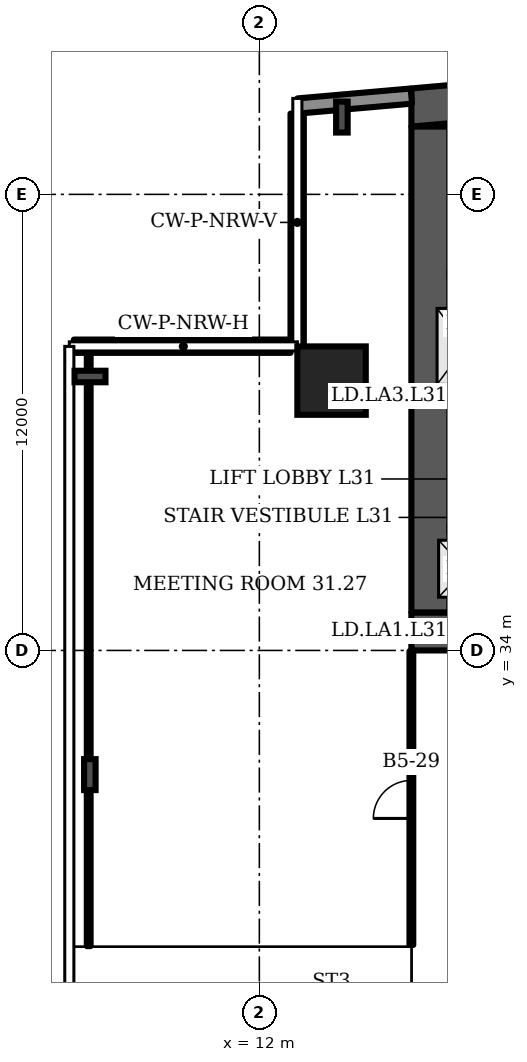
"""IFC4 building model, lengths in metres.
Left out: names, types, materials, properties, quantities, classifications, styles, units other than length and angle.
Written with IfcOpenShell. Run it as: python <this file> out.ifc"""

import sys

from ifc_helpers import new_model, si_unit, direction, frame, frame_2d, origin, origin_2d, place, context, subcontext, project, spatial, polyline, rectangle, i_section, outline, extrude, element, fill, save


model = new_model("IFC4")
c1 = context("Model", 3, precision=1e-05, world=origin(), true_north=direction((0.0, 1.0)))
c2 = subcontext(c1, "Body", "Model", "MODEL_VIEW")
j1 = project(units=[si_unit("LENGTHUNIT", "METRE"), si_unit("PLANEANGLEUNIT", "RADIAN")], contexts=[c1])
p1 = place(None, origin())
s1 = spatial("IfcSite", under=j1, at=p1, CompositionType="ELEMENT")
p2 = place(p1, origin())
s2 = spatial("IfcBuilding", under=s1, at=p2, CompositionType="ELEMENT")
p3 = place(p2, frame((0.0, 0.0, 132.7)))
s3 = spatial("IfcBuildingStorey", under=s2, at=p3, CompositionType="ELEMENT", Elevation=132.7)
p4 = place(p3, origin())
e1 = element("IfcWall", 1, at=p4, inside=s3, PredefinedType="SHEAR", context=c2, shape_type="SweptSolid", body=[
    extrude(outline(polyline([(16.0, 47.784), (40.5, 49.927), (65.0, 47.784), (65.0, 48.787), (40.5, 50.931), (16.0, 48.787), (16.0, 47.784)])), origin(), (0.0, 0.0, 1.0), 3.6),
])
p5 = place(p3, frame((16.0, 34.5, 0.0), z_axis=(0.0, 0.0, 1.0), x_axis=(1.0, 0.0, 0.0)))
e2 = element("IfcWall", 2, at=p5, inside=s3, PredefinedType="SHEAR", context=c2, shape_type="SweptSolid", body=[
    extrude(rectangle(XDim=49.0, YDim=1.0, at=frame_2d((24.5, 0.0))), origin(), (0.0, 0.0, 1.0), 3.6),
])
p6 = place(p5, frame((1.2, 0.0, 0.0)))
e3 = element("IfcOpeningElement", 3, at=p6, cuts=e2, PredefinedType="OPENING", context=c2, shape_type="SweptSolid", body=[
    extrude(rectangle(XDim=1.1, YDim=2.1, at=frame_2d((0.55, 1.05))), frame((0.0, 0.51, 0.0), z_axis=(0.0, -1.0, 0.0), x_axis=(1.0, 0.0, 0.0)), (0.0, 0.0, 1.0), 1.02),
])
p7 = place(p5, frame((5.083, 0.0, 0.0)))
e4 = element("IfcOpeningElement", 4, at=p7, cuts=e2, PredefinedType="OPENING", context=c2, shape_type="SweptSolid", body=[
    extrude(rectangle(XDim=1.1, YDim=2.1, at=frame_2d((0.55, 1.05))), frame((0.0, 0.51, 0.0), z_axis=(0.0, -1.0, 0.0), x_axis=(1.0, 0.0, 0.0)), (0.0, 0.0, 1.0), 1.02),
])
p8 = place(p5, frame((2.933, 0.0, 0.0)))
e5 = element("IfcOpeningElement", 5, at=p8, cuts=e2, PredefinedType="OPENING", context=c2, shape_type="SweptSolid", body=[
    extrude(rectangle(XDim=1.4, YDim=2.1, at=frame_2d((0.7, 1.05))), frame((0.0, 0.51, 0.0), z_axis=(0.0, -1.0, 0.0), x_axis=(1.0, 0.0, 0.0)), (0.0, 0.0, 1.0), 1.02),
])
p9 = place(p5, frame((7.65, 0.0, 0.0)))
e6 = element("IfcOpeningElement", 6, at=p9, cuts=e2, PredefinedType="OPENING", context=c2, shape_type="SweptSolid", body=[
    extrude(rectangle(XDim=1.2, YDim=2.1, at=frame_2d((0.6, 1.05))), frame((0.0, 0.51, 0.0), z_axis=(0.0, -1.0, 0.0), x_axis=(1.0, 0.0, 0.0)), (0.0, 0.0, 1.0), 1.02),
])
p10 = place(p5, frame((14.817, 0.0, 0.0)))
e7 = element("IfcOpeningElement", 7, at=p10, cuts=e2, PredefinedType="OPENING", context=c2, shape_type="SweptSolid", body=[
    extrude(rectangle(XDim=1.1, YDim=2.1, at=frame_2d((0.55, 1.05))), frame((0.0, 0.51, 0.0), z_axis=(0.0, -1.0, 0.0), x_axis=(1.0, 0.0, 0.0)), (0.0, 0.0, 1.0), 1.02),
])
p11 = place(p5, frame((19.083, 0.0, 0.0)))
e8 = element("IfcOpeningElement", 8, at=p11, cuts=e2, PredefinedType="OPENING", context=c2, shape_type="SweptSolid", body=[
    extrude(rectangle(XDim=1.1, YDim=2.1, at=frame_2d((0.55, 1.05))), frame((0.0, 0.51, 0.0), z_axis=(0.0, -1.0, 0.0), x_axis=(1.0, 0.0, 0.0)), (0.0, 0.0, 1.0), 1.02),
])
p12 = place(p5, frame((16.8, 0.0, 0.0)))
e9 = element("IfcOpeningElement", 9, at=p12, cuts=e2, PredefinedType="OPENING", context=c2, shape_type="SweptSolid", body=[
    extrude(rectangle(XDim=1.4, YDim=2.1, at=frame_2d((0.7, 1.05))), frame((0.0, 0.51, 0.0), z_axis=(0.0, -1.0, 0.0), x_axis=(1.0, 0.0, 0.0)), (0.0, 0.0, 1.0), 1.02),
])
p13 = place(p5, frame((21.817, 0.0, 0.0)))
e10 = element("IfcOpeningElement", 10, at=p13, cuts=e2, PredefinedType="OPENING", context=c2, shape_type="SweptSolid", body=[
    extrude(rectangle(XDim=1.1, YDim=2.1, at=frame_2d((0.55, 1.05))), frame((0.0, 0.51, 0.0), z_axis=(0.0, -1.0, 0.0), x_axis=(1.0, 0.0, 0.0)), (0.0, 0.0, 1.0), 1.02),
])
p14 = place(p5, frame((26.083, 0.0, 0.0)))
e11 = element("IfcOpeningElement", 11, at=p14, cuts=e2, PredefinedType="OPENING", context=c2, shape_type="SweptSolid", body=[
    extrude(rectangle(XDim=1.1, YDim=2.1, at=frame_2d((0.55, 1.05))), frame((0.0, 0.51, 0.0), z_axis=(0.0, -1.0, 0.0), x_axis=(1.0, 0.0, 0.0)), (0.0, 0.0, 1.0), 1.02),
])
p15 = place(p5, frame((33.15, 0.0, 0.0)))
e12 = element("IfcOpeningElement", 12, at=p15, cuts=e2, PredefinedType="OPENING", context=c2, shape_type="SweptSolid", body=[
    extrude(rectangle(XDim=1.2, YDim=2.1, at=frame_2d((0.6, 1.05))), frame((0.0, 0.51, 0.0), z_axis=(0.0, -1.0, 0.0), x_axis=(1.0, 0.0, 0.0)), (0.0, 0.0, 1.0), 1.02),
])
p16 = place(p5, frame((37.8, 0.0, 0.0)))
e13 = element("IfcOpeningElement", 13, at=p16, cuts=e2, PredefinedType="OPENING", context=c2, shape_type="SweptSolid", body=[
    extrude(rectangle(XDim=1.4, YDim=2.1, at=frame_2d((0.7, 1.05))), frame((0.0, 0.51, 0.0), z_axis=(0.0, -1.0, 0.0), x_axis=(1.0, 0.0, 0.0)), (0.0, 0.0, 1.0), 1.02),
])
p17 = place(p5, frame((42.817, 0.0, 0.0)))
e14 = element("IfcOpeningElement", 14, at=p17, cuts=e2, PredefinedType="OPENING", context=c2, shape_type="SweptSolid", body=[
    extrude(rectangle(XDim=1.1, YDim=2.1, at=frame_2d((0.55, 1.05))), frame((0.0, 0.51, 0.0), z_axis=(0.0, -1.0, 0.0), x_axis=(1.0, 0.0, 0.0)), (0.0, 0.0, 1.0), 1.02),
])
p18 = place(p5, frame((46.7, 0.0, 0.0)))
e15 = element("IfcOpeningElement", 15, at=p18, cuts=e2, PredefinedType="OPENING", context=c2, shape_type="SweptSolid", body=[
    extrude(rectangle(XDim=1.1, YDim=2.1, at=frame_2d((0.55, 1.05))), frame((0.0, 0.51, 0.0), z_axis=(0.0, -1.0, 0.0), x_axis=(1.0, 0.0, 0.0)), (0.0, 0.0, 1.0), 1.02),
])
p19 = place(p5, frame((44.667, 0.0, 0.0)))
e16 = element("IfcOpeningElement", 16, at=p19, cuts=e2, PredefinedType="OPENING", context=c2, shape_type="SweptSolid", body=[
    extrude(rectangle(XDim=1.4, YDim=2.1, at=frame_2d((0.7, 1.05))), frame((0.0, 0.51, 0.0), z_axis=(0.0, -1.0, 0.0), x_axis=(1.0, 0.0, 0.0)), (0.0, 0.0, 1.0), 1.02),
])
p20 = place(p3, frame((16.5, 35.0, 0.0), z_axis=(0.0, 0.0, 1.0), x_axis=(0.0, 1.0, 0.0)))
e17 = element("IfcWall", 17, at=p20, inside=s3, PredefinedType="SHEAR", context=c2, shape_type="SweptSolid", body=[
    extrude(rectangle(XDim=12.784, YDim=1.0, at=frame_2d((6.392, 0.0))), origin(), (0.0, 0.0, 1.0), 3.6),
])
p21 = place(p3, frame((13.9, 41.1, 0.0), z_axis=(0.0, 0.0, 1.0), x_axis=(1.0, 0.0, 0.0)))
e18 = element("IfcColumn", 18, at=p21, inside=s3, PredefinedType="COLUMN", context=c2, shape_type="SweptSolid", body=[
    extrude(rectangle(XDim=1.8, YDim=1.8, at=origin_2d()), origin(), (0.0, 0.0, 1.0), 3.6),
])
for number, where, z_axis, x_axis in (
    (19, (14.172, 48.034, 0.0), (0.0, 0.0, 1.0), (-1.0, 0.0, 0.0)),
    (20, (7.544, 41.208, 0.0), (0.0, 0.0, 1.0), (0.0, 1.0, 0.0)),
    (21, (7.54, 30.733, 0.0), (0.0, 0.0, 1.0), (-1.0, 0.0, 0.0)),
):
    element("IfcColumn", number, at=place(p3, frame(where, z_axis=z_axis, x_axis=x_axis)), inside=s3, PredefinedType="COLUMN", context=c2, shape_type="SweptSolid", body=[
        extrude(i_section(OverallWidth=0.303, OverallDepth=0.814, WebThickness=0.021, FlangeThickness=0.04, FilletRadius=0.03, at=origin_2d()), origin(), (0.0, 0.0, 1.0), 3.6),
    ])
p22 = place(p3, frame((16.0, 48.587, 0.0), z_axis=(0.0, 0.0, 1.0), x_axis=(-0.996194, -0.087168, 0.0)))
e22 = element("IfcWall", 22, at=p22, inside=s3, PredefinedType="SOLIDWALL", context=c2, shape_type="SweptSolid", body=[
    extrude(rectangle(XDim=2.994, YDim=0.4, at=frame_2d((1.497, 0.0))), origin(), (0.0, 0.0, 1.0), 3.2),
])
p23 = place(p3, frame((12.995, 48.126, 0.0), z_axis=(0.0, 0.0, 1.0), x_axis=(0.0, -1.0, 0.0)))
e23 = element("IfcWall", 23, at=p23, inside=s3, PredefinedType="SOLIDWALL", context=c2, shape_type="SweptSolid", body=[
    extrude(rectangle(XDim=6.126, YDim=0.35, at=frame_2d((3.063, 0.0))), origin(), (0.0, 0.0, 1.0), 1.0),
])
p24 = place(p3, frame((12.82, 42.005, 0.0), z_axis=(0.0, 0.0, 1.0), x_axis=(-1.0, 0.0, 0.0)))
e24 = element("IfcWall", 24, at=p24, inside=s3, PredefinedType="SOLIDWALL", context=c2, shape_type="SweptSolid", body=[
    extrude(rectangle(XDim=5.7, YDim=0.35, at=frame_2d((2.85, 0.0))), origin(), (0.0, 0.0, 1.0), 1.0),
])
p25 = place(p3, frame((7.51, 26.22, 0.0), z_axis=(0.0, 0.0, 1.0), x_axis=(0.0, 1.0, 0.0)))
e25 = element("IfcWall", 25, at=p25, inside=s3, PredefinedType="PARTITIONING", context=c2, shape_type="SweptSolid", body=[
    extrude(rectangle(XDim=15.76, YDim=0.1, at=frame_2d((7.88, 0.0))), origin(), (0.0, 0.0, 1.0), 2.58),
])
p26 = place(p3, frame((16.0, 26.25, 0.0), z_axis=(0.0, 0.0, 1.0), x_axis=(0.0, 1.0, 0.0)))
e26 = element("IfcWall", 26, at=p26, inside=s3, PredefinedType="PARTITIONING", context=c2, shape_type="SweptSolid", body=[
    extrude(rectangle(XDim=7.73, YDim=0.1, at=frame_2d((3.865, 0.0))), origin(), (0.0, 0.0, 1.0), 3.2),
])
p27 = place(p26, frame((3.33, 0.0, 0.0)))
e27 = element("IfcOpeningElement", 27, at=p27, cuts=e26, PredefinedType="OPENING", context=c2, shape_type="SweptSolid", body=[
    extrude(rectangle(XDim=1.0, YDim=2.1, at=frame_2d((0.5, 1.05))), frame((0.0, 0.06, 0.0), z_axis=(0.0, -1.0, 0.0), x_axis=(1.0, 0.0, 0.0)), (0.0, 0.0, 1.0), 0.12),
])
p28 = place(p27, origin())
e28 = element("IfcDoor", 28, at=p28, inside=s3, OperationType="SINGLE_SWING_LEFT", PredefinedType="DOOR", context=c2, shape_type="SweptSolid", body=[
    extrude(rectangle(XDim=1.0, YDim=2.1, at=frame_2d((0.5, 1.05))), frame((0.0, 0.025, 0.0), z_axis=(0.0, -1.0, 0.0), x_axis=(1.0, 0.0, 0.0)), (0.0, 0.0, 1.0), 0.05),
])
fill(e27, e28)
save(model, sys.argv[1])
